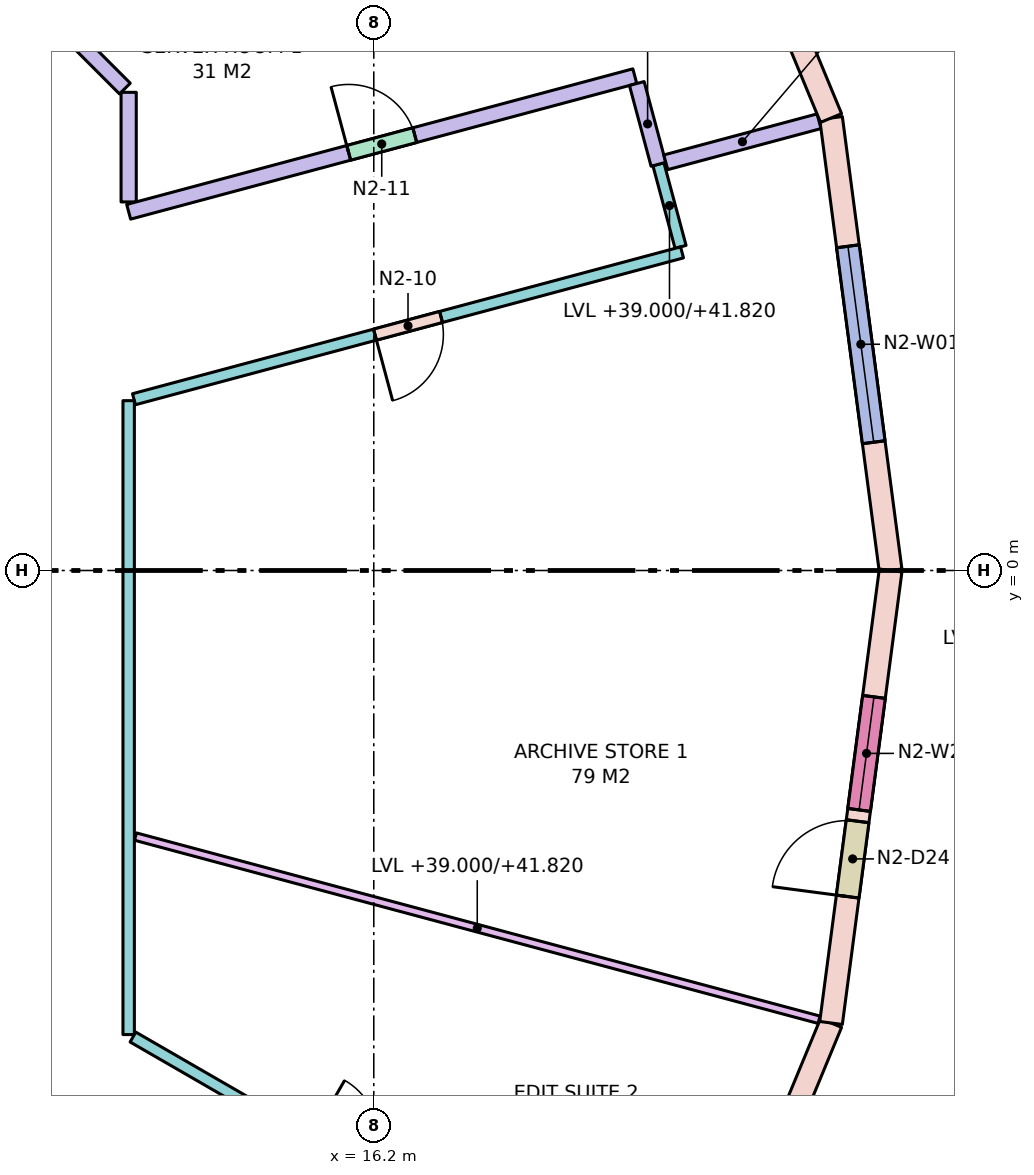
"""IFC4 building model, lengths in metres.
Left out: names, types, materials, properties, quantities, classifications, styles, units other than length and angle.
Written with IfcOpenShell. Run it as: python <this file> out.ifc"""

import sys

from ifc_helpers import new_model, si_unit, direction, frame, frame_2d, origin, place, context, subcontext, project, spatial, rectangle, extrude, element, fill, save


model = new_model("IFC4")
c1 = context("Model", 3, precision=1e-05, world=origin(), true_north=direction((0.0, 1.0)))
c2 = subcontext(c1, "Body", "Model", "MODEL_VIEW")
j1 = project(units=[si_unit("LENGTHUNIT", "METRE"), si_unit("PLANEANGLEUNIT", "RADIAN")], contexts=[c1])
p1 = place(None, origin())
s1 = spatial("IfcSite", under=j1, at=p1, CompositionType="ELEMENT")
p2 = place(p1, origin())
s2 = spatial("IfcBuilding", under=s1, at=p2, CompositionType="ELEMENT")
p3 = place(p2, frame((0.0, 0.0, 39.0)))
s3 = spatial("IfcBuildingStorey", under=s2, at=p3, CompositionType="ELEMENT", Elevation=39.0)
p4 = place(p3, frame((23.0, 0.0, 0.0), z_axis=(0.0, 0.0, 1.0), x_axis=(-0.130522880875, 0.991445297315, 0.0)))
e1 = element("IfcWall", 1, at=p4, inside=s3, PredefinedType="STANDARD", context=c2, shape_type="SweptSolid", body=[
    extrude(rectangle(XDim=6.004, YDim=0.3, at=frame_2d((3.002, 0.0))), origin(), (0.0, 0.0, 1.0), 3.72),
])
p5 = place(p4, frame((1.702, 0.0, 0.8)))
e2 = element("IfcOpeningElement", 2, at=p5, cuts=e1, PredefinedType="OPENING", context=c2, shape_type="SweptSolid", body=[
    extrude(rectangle(XDim=2.6, YDim=2.7, at=frame_2d((1.3, 1.35))), frame((0.0, 0.16, 0.0), z_axis=(0.0, -1.0, 0.0), x_axis=(1.0, 0.0, 0.0)), (0.0, 0.0, 1.0), 0.32),
])
p6 = place(p3, frame((22.216, 5.953, 0.0), z_axis=(0.0, 0.0, 1.0), x_axis=(-0.382671411433, 0.923884511653, 0.0)))
e3 = element("IfcWall", 3, at=p6, inside=s3, PredefinedType="STANDARD", context=c2, shape_type="SweptSolid", body=[
    extrude(rectangle(XDim=6.004, YDim=0.3, at=frame_2d((3.002, 0.0))), origin(), (0.0, 0.0, 1.0), 3.72),
])
p7 = place(p6, frame((1.677, 0.0, 0.0)))
e4 = element("IfcOpeningElement", 4, at=p7, cuts=e3, PredefinedType="OPENING", context=c2, shape_type="SweptSolid", body=[
    extrude(rectangle(XDim=1.0, YDim=2.4, at=frame_2d((0.5, 1.2))), frame((0.0, 0.16, 0.0), z_axis=(0.0, -1.0, 0.0), x_axis=(1.0, 0.0, 0.0)), (0.0, 0.0, 1.0), 0.32),
])
p8 = place(p6, frame((2.827, 0.0, 0.8)))
e5 = element("IfcOpeningElement", 5, at=p8, cuts=e3, PredefinedType="OPENING", context=c2, shape_type="SweptSolid", body=[
    extrude(rectangle(XDim=1.5, YDim=2.7, at=frame_2d((0.75, 1.35))), frame((0.0, 0.16, 0.0), z_axis=(0.0, -1.0, 0.0), x_axis=(1.0, 0.0, 0.0)), (0.0, 0.0, 1.0), 0.32),
])
p9 = place(p3, frame((19.919, -11.5, 0.0), z_axis=(0.0, 0.0, 1.0), x_axis=(0.382671411433, 0.923884511653, 0.0)))
e6 = element("IfcWall", 6, at=p9, inside=s3, PredefinedType="STANDARD", context=c2, shape_type="SweptSolid", body=[
    extrude(rectangle(XDim=6.004, YDim=0.3, at=frame_2d((3.002, 0.0))), origin(), (0.0, 0.0, 1.0), 3.72),
])
p10 = place(p9, frame((1.702, 0.0, 0.8)))
e7 = element("IfcOpeningElement", 7, at=p10, cuts=e6, PredefinedType="OPENING", context=c2, shape_type="SweptSolid", body=[
    extrude(rectangle(XDim=2.6, YDim=2.7, at=frame_2d((1.3, 1.35))), frame((0.0, 0.16, 0.0), z_axis=(0.0, -1.0, 0.0), x_axis=(1.0, 0.0, 0.0)), (0.0, 0.0, 1.0), 0.32),
])
p11 = place(p3, frame((22.216, -5.953, 0.0), z_axis=(0.0, 0.0, 1.0), x_axis=(0.130522880875, 0.991445297315, 0.0)))
e8 = element("IfcWall", 8, at=p11, inside=s3, PredefinedType="STANDARD", context=c2, shape_type="SweptSolid", body=[
    extrude(rectangle(XDim=6.004, YDim=0.3, at=frame_2d((3.002, 0.0))), origin(), (0.0, 0.0, 1.0), 3.72),
])
p12 = place(p11, frame((1.677, 0.0, 0.0)))
e9 = element("IfcOpeningElement", 9, at=p12, cuts=e8, PredefinedType="OPENING", context=c2, shape_type="SweptSolid", body=[
    extrude(rectangle(XDim=1.0, YDim=2.4, at=frame_2d((0.5, 1.2))), frame((0.0, 0.16, 0.0), z_axis=(0.0, -1.0, 0.0), x_axis=(1.0, 0.0, 0.0)), (0.0, 0.0, 1.0), 0.32),
])
p13 = place(p11, frame((2.827, 0.0, 0.8)))
e10 = element("IfcOpeningElement", 10, at=p13, cuts=e8, PredefinedType="OPENING", context=c2, shape_type="SweptSolid", body=[
    extrude(rectangle(XDim=1.5, YDim=2.7, at=frame_2d((0.75, 1.35))), frame((0.0, 0.16, 0.0), z_axis=(0.0, -1.0, 0.0), x_axis=(1.0, 0.0, 0.0)), (0.0, 0.0, 1.0), 0.32),
])
p14 = place(p3, frame((12.214, 7.052, 0.0), z_axis=(0.0, 0.0, 1.0), x_axis=(0.707106781187, -0.707106781187, 0.0)))
e11 = element("IfcWall", 11, at=p14, inside=s3, PredefinedType="PARTITIONING", context=c2, shape_type="SweptSolid", body=[
    extrude(rectangle(XDim=1.006, YDim=0.2, at=frame_2d((0.503, 0.0))), origin(), (0.0, 0.0, 1.0), 2.82),
])
p15 = place(p3, frame((12.975, 6.291, 0.0), z_axis=(0.0, 0.0, 1.0), x_axis=(0.0, -1.0, 0.0)))
e12 = element("IfcWall", 12, at=p15, inside=s3, PredefinedType="PARTITIONING", context=c2, shape_type="SweptSolid", body=[
    extrude(rectangle(XDim=1.442, YDim=0.2, at=frame_2d((0.721, 0.0))), origin(), (0.0, 0.0, 1.0), 3.72),
])
p16 = place(p3, frame((12.975, 4.719, 0.0), z_axis=(0.0, 0.0, 1.0), x_axis=(0.965924499418, 0.258823997003, 0.0)))
e13 = element("IfcWall", 13, at=p16, inside=s3, PredefinedType="PARTITIONING", context=c2, shape_type="SweptSolid", body=[
    extrude(rectangle(XDim=6.894, YDim=0.2, at=frame_2d((3.447, 0.0))), origin(), (0.0, 0.0, 1.0), 3.72),
])
p17 = place(p16, frame((2.997, 0.0, 0.0)))
e14 = element("IfcOpeningElement", 14, at=p17, cuts=e13, PredefinedType="OPENING", context=c2, shape_type="SweptSolid", body=[
    extrude(rectangle(XDim=0.9, YDim=2.1, at=frame_2d((0.45, 1.05))), frame((0.0, 0.11, 0.0), z_axis=(0.0, -1.0, 0.0), x_axis=(1.0, 0.0, 0.0)), (0.0, 0.0, 1.0), 0.22),
])
p18 = place(p3, frame((19.66, 6.407, 0.0), z_axis=(0.0, 0.0, 1.0), x_axis=(0.258795254151, -0.965932200741, 0.0)))
e15 = element("IfcWall", 15, at=p18, inside=s3, PredefinedType="PARTITIONING", context=c2, shape_type="SweptSolid", body=[
    extrude(rectangle(XDim=1.1, YDim=0.2, at=frame_2d((0.55, 0.0))), origin(), (0.0, 0.0, 1.0), 2.82),
])
p19 = place(p3, frame((19.945, 5.344, 0.0), z_axis=(0.0, 0.0, 1.0), x_axis=(0.258891558609, -0.965906393436, 0.0)))
e16 = element("IfcWall", 16, at=p19, inside=s3, PredefinedType="PARTITIONING", context=c2, shape_type="SweptSolid", body=[
    extrude(rectangle(XDim=1.125, YDim=0.15, at=frame_2d((0.562, 0.0))), origin(), (0.0, 0.0, 1.0), 2.82),
])
p20 = place(p3, frame((20.256, 4.185, 0.0), z_axis=(0.0, 0.0, 1.0), x_axis=(-0.965924840231, -0.258822725092, 0.0)))
e17 = element("IfcWall", 17, at=p20, inside=s3, PredefinedType="PARTITIONING", context=c2, shape_type="SweptSolid", body=[
    extrude(rectangle(XDim=7.465, YDim=0.15, at=frame_2d((3.732, 0.0))), origin(), (0.0, 0.0, 1.0), 3.72),
])
p21 = place(p20, frame((3.282, 0.0, 0.0)))
e18 = element("IfcOpeningElement", 18, at=p21, cuts=e17, PredefinedType="OPENING", context=c2, shape_type="SweptSolid", body=[
    extrude(rectangle(XDim=0.9, YDim=2.1, at=frame_2d((0.45, 1.05))), frame((0.0, 0.085, 0.0), z_axis=(0.0, -1.0, 0.0), x_axis=(1.0, 0.0, 0.0)), (0.0, 0.0, 1.0), 0.17),
])
p22 = place(p3, frame((12.975, 2.234, 0.0), z_axis=(0.0, 0.0, 1.0), x_axis=(0.0, -1.0, 0.0)))
e19 = element("IfcWall", 19, at=p22, inside=s3, PredefinedType="PARTITIONING", context=c2, shape_type="SweptSolid", body=[
    extrude(rectangle(XDim=8.34, YDim=0.15, at=frame_2d((4.17, 0.0))), origin(), (0.0, 0.0, 1.0), 2.82),
])
p23 = place(p3, frame((13.031, -6.138, 0.0), z_axis=(0.0, 0.0, 1.0), x_axis=(0.86602669382, -0.499997765587, 0.0)))
e20 = element("IfcWall", 20, at=p23, inside=s3, PredefinedType="PARTITIONING", context=c2, shape_type="SweptSolid", body=[
    extrude(rectangle(XDim=6.294, YDim=0.15, at=frame_2d((3.147, 0.0))), origin(), (0.0, 0.0, 1.0), 3.72),
])
p24 = place(p23, frame((2.697, 0.0, 0.0)))
e21 = element("IfcOpeningElement", 21, at=p24, cuts=e20, PredefinedType="OPENING", context=c2, shape_type="SweptSolid", body=[
    extrude(rectangle(XDim=0.9, YDim=2.1, at=frame_2d((0.45, 1.05))), frame((0.0, 0.085, 0.0), z_axis=(0.0, -1.0, 0.0), x_axis=(1.0, 0.0, 0.0)), (0.0, 0.0, 1.0), 0.17),
])
p25 = place(p3, frame((20.042, 5.37, 0.0), z_axis=(0.0, 0.0, 1.0), x_axis=(0.965912035991, 0.258870505712, 0.0)))
e22 = element("IfcWall", 22, at=p25, inside=s3, PredefinedType="PARTITIONING", context=c2, shape_type="SweptSolid", body=[
    extrude(rectangle(XDim=2.088, YDim=0.2, at=frame_2d((1.044, 0.0))), origin(), (0.0, 0.0, 1.0), 2.82),
])
p26 = place(p3, frame((13.064, -3.5, 0.0), z_axis=(0.0, 0.0, 1.0), x_axis=(0.965922655056, -0.258830880017, 0.0)))
e23 = element("IfcWall", 23, at=p26, inside=s3, PredefinedType="PARTITIONING", context=c2, shape_type="SweptSolid", body=[
    extrude(rectangle(XDim=9.312, YDim=0.1, at=frame_2d((4.656, 0.0))), origin(), (0.0, 0.0, 1.0), 2.82),
])
p27 = place(p5, origin())
e24 = element("IfcWindow", 24, at=p27, inside=s3, PartitioningType="SINGLE_PANEL", PredefinedType="WINDOW", context=c2, shape_type="SweptSolid", body=[
    extrude(rectangle(XDim=2.6, YDim=2.7, at=frame_2d((1.3, 1.35))), frame((0.0, 0.03, 0.0), z_axis=(0.0, -1.0, 0.0), x_axis=(1.0, 0.0, 0.0)), (0.0, 0.0, 1.0), 0.06),
])
fill(e2, e24)
p28 = place(p12, origin())
e25 = element("IfcDoor", 25, at=p28, inside=s3, OperationType="SINGLE_SWING_LEFT", PredefinedType="DOOR", context=c2, shape_type="SweptSolid", body=[
    extrude(rectangle(XDim=1.0, YDim=2.4, at=frame_2d((0.5, 1.2))), frame((0.0, 0.025, 0.0), z_axis=(0.0, -1.0, 0.0), x_axis=(1.0, 0.0, 0.0)), (0.0, 0.0, 1.0), 0.05),
])
fill(e9, e25)
p29 = place(p13, origin())
e26 = element("IfcWindow", 26, at=p29, inside=s3, PartitioningType="SINGLE_PANEL", PredefinedType="WINDOW", context=c2, shape_type="SweptSolid", body=[
    extrude(rectangle(XDim=1.5, YDim=2.7, at=frame_2d((0.75, 1.35))), frame((0.0, 0.03, 0.0), z_axis=(0.0, -1.0, 0.0), x_axis=(1.0, 0.0, 0.0)), (0.0, 0.0, 1.0), 0.06),
])
fill(e10, e26)
p30 = place(p21, origin())
e27 = element("IfcDoor", 27, at=p30, inside=s3, OperationType="SINGLE_SWING_RIGHT", PredefinedType="DOOR", context=c2, shape_type="SweptSolid", body=[
    extrude(rectangle(XDim=0.9, YDim=2.1, at=frame_2d((0.45, 1.05))), frame((0.0, 0.025, 0.0), z_axis=(0.0, -1.0, 0.0), x_axis=(1.0, 0.0, 0.0)), (0.0, 0.0, 1.0), 0.05),
])
fill(e18, e27)
p31 = place(p17, origin())
e28 = element("IfcDoor", 28, at=p31, inside=s3, OperationType="SINGLE_SWING_LEFT", PredefinedType="DOOR", context=c2, shape_type="SweptSolid", body=[
    extrude(rectangle(XDim=0.9, YDim=2.1, at=frame_2d((0.45, 1.05))), frame((0.0, 0.025, 0.0), z_axis=(0.0, -1.0, 0.0), x_axis=(1.0, 0.0, 0.0)), (0.0, 0.0, 1.0), 0.05),
])
fill(e14, e28)
save(model, sys.argv[1])
